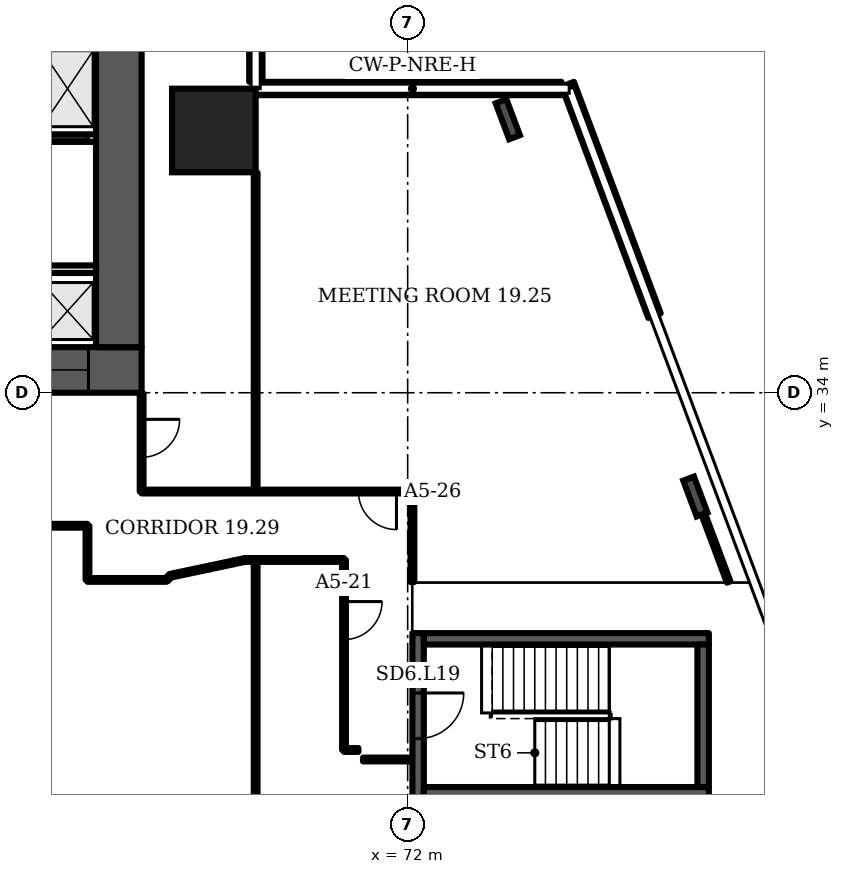
"""IFC4 building model, lengths in metres.
Left out: names, types, materials, properties, quantities, classifications, styles, units other than length and angle.
Written with IfcOpenShell. Run it as: python <this file> out.ifc"""

import sys

from ifc_helpers import new_model, si_unit, direction, frame, frame_2d, origin, origin_2d, place, context, subcontext, project, spatial, polyline, rectangle, i_section, outline, extrude, element, fill, save


model = new_model("IFC4")
c1 = context("Model", 3, precision=1e-05, world=origin(), true_north=direction((0.0, 1.0)))
c2 = subcontext(c1, "Body", "Model", "MODEL_VIEW")
j1 = project(units=[si_unit("LENGTHUNIT", "METRE"), si_unit("PLANEANGLEUNIT", "RADIAN")], contexts=[c1])
p1 = place(None, origin())
s1 = spatial("IfcSite", under=j1, at=p1, CompositionType="ELEMENT")
p2 = place(p1, origin())
s2 = spatial("IfcBuilding", under=s1, at=p2, CompositionType="ELEMENT")
p3 = place(p2, frame((0.0, 0.0, 88.3)))
s3 = spatial("IfcBuildingStorey", under=s2, at=p3, CompositionType="ELEMENT", Elevation=88.3)
p4 = place(p3, frame((9.0, 34.6, 0.0), z_axis=(0.0, 0.0, 1.0), x_axis=(1.0, 0.0, 0.0)))
e1 = element("IfcWall", 1, at=p4, inside=s3, PredefinedType="SHEAR", context=c2, shape_type="SweptSolid", body=[
    extrude(rectangle(XDim=56.0, YDim=1.2, at=frame_2d((28.0, 0.0))), origin(), (0.0, 0.0, 1.0), 3.6),
])
p5 = place(p4, frame((2.0, 0.0, 0.0)))
e2 = element("IfcOpeningElement", 2, at=p5, cuts=e1, PredefinedType="OPENING", context=c2, shape_type="SweptSolid", body=[
    extrude(rectangle(XDim=1.0, YDim=2.1, at=frame_2d((0.5, 1.05))), frame((0.0, 0.61, 0.0), z_axis=(0.0, -1.0, 0.0), x_axis=(1.0, 0.0, 0.0)), (0.0, 0.0, 1.0), 1.22),
])
p6 = place(p4, frame((4.6, 0.0, 0.0)))
e3 = element("IfcOpeningElement", 3, at=p6, cuts=e1, PredefinedType="OPENING", context=c2, shape_type="SweptSolid", body=[
    extrude(rectangle(XDim=1.0, YDim=2.1, at=frame_2d((0.5, 1.05))), frame((0.0, 0.61, 0.0), z_axis=(0.0, -1.0, 0.0), x_axis=(1.0, 0.0, 0.0)), (0.0, 0.0, 1.0), 1.22),
])
p7 = place(p4, frame((7.867, 0.0, 0.0)))
e4 = element("IfcOpeningElement", 4, at=p7, cuts=e1, PredefinedType="OPENING", context=c2, shape_type="SweptSolid", body=[
    extrude(rectangle(XDim=1.1, YDim=2.1, at=frame_2d((0.55, 1.05))), frame((0.0, 0.61, 0.0), z_axis=(0.0, -1.0, 0.0), x_axis=(1.0, 0.0, 0.0)), (0.0, 0.0, 1.0), 1.22),
])
p8 = place(p4, frame((12.033, 0.0, 0.0)))
e5 = element("IfcOpeningElement", 5, at=p8, cuts=e1, PredefinedType="OPENING", context=c2, shape_type="SweptSolid", body=[
    extrude(rectangle(XDim=1.1, YDim=2.1, at=frame_2d((0.55, 1.05))), frame((0.0, 0.61, 0.0), z_axis=(0.0, -1.0, 0.0), x_axis=(1.0, 0.0, 0.0)), (0.0, 0.0, 1.0), 1.22),
])
p9 = place(p4, frame((9.8, 0.0, 0.0)))
e6 = element("IfcOpeningElement", 6, at=p9, cuts=e1, PredefinedType="OPENING", context=c2, shape_type="SweptSolid", body=[
    extrude(rectangle(XDim=1.4, YDim=2.1, at=frame_2d((0.7, 1.05))), frame((0.0, 0.61, 0.0), z_axis=(0.0, -1.0, 0.0), x_axis=(1.0, 0.0, 0.0)), (0.0, 0.0, 1.0), 1.22),
])
p10 = place(p4, frame((14.65, 0.0, 0.0)))
e7 = element("IfcOpeningElement", 7, at=p10, cuts=e1, PredefinedType="OPENING", context=c2, shape_type="SweptSolid", body=[
    extrude(rectangle(XDim=1.2, YDim=2.1, at=frame_2d((0.6, 1.05))), frame((0.0, 0.61, 0.0), z_axis=(0.0, -1.0, 0.0), x_axis=(1.0, 0.0, 0.0)), (0.0, 0.0, 1.0), 1.22),
])
p11 = place(p4, frame((21.867, 0.0, 0.0)))
e8 = element("IfcOpeningElement", 8, at=p11, cuts=e1, PredefinedType="OPENING", context=c2, shape_type="SweptSolid", body=[
    extrude(rectangle(XDim=1.1, YDim=2.1, at=frame_2d((0.55, 1.05))), frame((0.0, 0.61, 0.0), z_axis=(0.0, -1.0, 0.0), x_axis=(1.0, 0.0, 0.0)), (0.0, 0.0, 1.0), 1.22),
])
p12 = place(p4, frame((26.033, 0.0, 0.0)))
e9 = element("IfcOpeningElement", 9, at=p12, cuts=e1, PredefinedType="OPENING", context=c2, shape_type="SweptSolid", body=[
    extrude(rectangle(XDim=1.1, YDim=2.1, at=frame_2d((0.55, 1.05))), frame((0.0, 0.61, 0.0), z_axis=(0.0, -1.0, 0.0), x_axis=(1.0, 0.0, 0.0)), (0.0, 0.0, 1.0), 1.22),
])
p13 = place(p4, frame((23.8, 0.0, 0.0)))
e10 = element("IfcOpeningElement", 10, at=p13, cuts=e1, PredefinedType="OPENING", context=c2, shape_type="SweptSolid", body=[
    extrude(rectangle(XDim=1.4, YDim=2.1, at=frame_2d((0.7, 1.05))), frame((0.0, 0.61, 0.0), z_axis=(0.0, -1.0, 0.0), x_axis=(1.0, 0.0, 0.0)), (0.0, 0.0, 1.0), 1.22),
])
p14 = place(p4, frame((28.867, 0.0, 0.0)))
e11 = element("IfcOpeningElement", 11, at=p14, cuts=e1, PredefinedType="OPENING", context=c2, shape_type="SweptSolid", body=[
    extrude(rectangle(XDim=1.1, YDim=2.1, at=frame_2d((0.55, 1.05))), frame((0.0, 0.61, 0.0), z_axis=(0.0, -1.0, 0.0), x_axis=(1.0, 0.0, 0.0)), (0.0, 0.0, 1.0), 1.22),
])
p15 = place(p4, frame((33.033, 0.0, 0.0)))
e12 = element("IfcOpeningElement", 12, at=p15, cuts=e1, PredefinedType="OPENING", context=c2, shape_type="SweptSolid", body=[
    extrude(rectangle(XDim=1.1, YDim=2.1, at=frame_2d((0.55, 1.05))), frame((0.0, 0.61, 0.0), z_axis=(0.0, -1.0, 0.0), x_axis=(1.0, 0.0, 0.0)), (0.0, 0.0, 1.0), 1.22),
])
p16 = place(p4, frame((40.15, 0.0, 0.0)))
e13 = element("IfcOpeningElement", 13, at=p16, cuts=e1, PredefinedType="OPENING", context=c2, shape_type="SweptSolid", body=[
    extrude(rectangle(XDim=1.2, YDim=2.1, at=frame_2d((0.6, 1.05))), frame((0.0, 0.61, 0.0), z_axis=(0.0, -1.0, 0.0), x_axis=(1.0, 0.0, 0.0)), (0.0, 0.0, 1.0), 1.22),
])
p17 = place(p4, frame((44.8, 0.0, 0.0)))
e14 = element("IfcOpeningElement", 14, at=p17, cuts=e1, PredefinedType="OPENING", context=c2, shape_type="SweptSolid", body=[
    extrude(rectangle(XDim=1.4, YDim=2.1, at=frame_2d((0.7, 1.05))), frame((0.0, 0.61, 0.0), z_axis=(0.0, -1.0, 0.0), x_axis=(1.0, 0.0, 0.0)), (0.0, 0.0, 1.0), 1.22),
])
p18 = place(p4, frame((49.867, 0.0, 0.0)))
e15 = element("IfcOpeningElement", 15, at=p18, cuts=e1, PredefinedType="OPENING", context=c2, shape_type="SweptSolid", body=[
    extrude(rectangle(XDim=1.1, YDim=2.1, at=frame_2d((0.55, 1.05))), frame((0.0, 0.61, 0.0), z_axis=(0.0, -1.0, 0.0), x_axis=(1.0, 0.0, 0.0)), (0.0, 0.0, 1.0), 1.22),
])
p19 = place(p4, frame((53.5, 0.0, 0.0)))
e16 = element("IfcOpeningElement", 16, at=p19, cuts=e1, PredefinedType="OPENING", context=c2, shape_type="SweptSolid", body=[
    extrude(rectangle(XDim=1.1, YDim=2.1, at=frame_2d((0.55, 1.05))), frame((0.0, 0.61, 0.0), z_axis=(0.0, -1.0, 0.0), x_axis=(1.0, 0.0, 0.0)), (0.0, 0.0, 1.0), 1.22),
])
p20 = place(p4, frame((51.567, 0.0, 0.0)))
e17 = element("IfcOpeningElement", 17, at=p20, cuts=e1, PredefinedType="OPENING", context=c2, shape_type="SweptSolid", body=[
    extrude(rectangle(XDim=1.4, YDim=2.1, at=frame_2d((0.7, 1.05))), frame((0.0, 0.61, 0.0), z_axis=(0.0, -1.0, 0.0), x_axis=(1.0, 0.0, 0.0)), (0.0, 0.0, 1.0), 1.22),
])
p21 = place(p3, frame((64.4, 35.2, 0.0), z_axis=(0.0, 0.0, 1.0), x_axis=(0.0, 1.0, 0.0)))
e18 = element("IfcWall", 18, at=p21, inside=s3, PredefinedType="SHEAR", context=c2, shape_type="SweptSolid", body=[
    extrude(rectangle(XDim=12.383, YDim=1.2, at=frame_2d((6.191, 0.0))), origin(), (0.0, 0.0, 1.0), 3.6),
])
p22 = place(p3, frame((66.9, 40.9, 0.0), z_axis=(0.0, 0.0, 1.0), x_axis=(1.0, 0.0, 0.0)))
e19 = element("IfcColumn", 19, at=p22, inside=s3, PredefinedType="COLUMN", context=c2, shape_type="SweptSolid", body=[
    extrude(rectangle(XDim=2.2, YDim=2.2, at=origin_2d()), origin(), (0.0, 0.0, 1.0), 3.6),
])
for number, where, z_axis, x_axis in (
    (20, (79.57, 31.268, 0.0), (0.0, 0.0, 1.0), (0.936, 0.351, 0.0)),
    (21, (74.634, 41.196, 0.0), (0.0, 0.0, 1.0), (0.936, 0.351, 0.0)),
):
    element("IfcColumn", number, at=place(p3, frame(where, z_axis=z_axis, x_axis=x_axis)), inside=s3, PredefinedType="COLUMN", context=c2, shape_type="SweptSolid", body=[
        extrude(i_section(OverallWidth=0.302, OverallDepth=1.008, WebThickness=0.021, FlangeThickness=0.04, FilletRadius=0.03, at=origin_2d()), origin(), (0.0, 0.0, 1.0), 3.6),
    ])
p23 = place(p3, frame((78.494, 36.03, 0.0), z_axis=(0.0, 0.0, 1.0), x_axis=(-0.351108, 0.936338, 0.0)))
e22 = element("IfcWall", 22, at=p23, inside=s3, PredefinedType="SOLIDWALL", context=c2, shape_type="SweptSolid", body=[
    extrude(rectangle(XDim=6.503, YDim=0.35, at=frame_2d((3.251, 0.0))), origin(), (0.0, 0.0, 1.0), 1.0),
])
p24 = place(p3, frame((76.047, 42.005, 0.0), z_axis=(0.0, 0.0, 1.0), x_axis=(-1.0, 0.0, 0.0)))
e23 = element("IfcWall", 23, at=p24, inside=s3, PredefinedType="SOLIDWALL", context=c2, shape_type="SweptSolid", body=[
    extrude(rectangle(XDim=8.047, YDim=0.35, at=frame_2d((4.023, 0.0))), origin(), (0.0, 0.0, 1.0), 1.0),
])
p25 = place(p3, frame((68.005, 42.18, 0.0), z_axis=(0.0, 0.0, 1.0), x_axis=(0.0, 1.0, 0.0)))
e24 = element("IfcWall", 24, at=p25, inside=s3, PredefinedType="SOLIDWALL", context=c2, shape_type="SweptSolid", body=[
    extrude(rectangle(XDim=5.947, YDim=0.35, at=frame_2d((2.973, 0.0))), origin(), (0.0, 0.0, 1.0), 1.0),
])
p26 = place(p3, frame((58.6, 40.7, 0.0), z_axis=(0.0, 0.0, 1.0), x_axis=(1.0, 0.0, 0.0)))
e25 = element("IfcWall", 25, at=p26, inside=s3, PredefinedType="PARTITIONING", context=c2, shape_type="SweptSolid", body=[
    extrude(rectangle(XDim=5.2, YDim=0.2, at=frame_2d((2.6, 0.0))), origin(), (0.0, 0.0, 1.0), 3.15),
])
p27 = place(p26, frame((0.267, 0.0, 0.0)))
e26 = element("IfcOpeningElement", 26, at=p27, cuts=e25, PredefinedType="OPENING", context=c2, shape_type="SweptSolid", body=[
    extrude(rectangle(XDim=1.1, YDim=2.1, at=frame_2d((0.55, 1.05))), frame((0.0, 0.11, 0.0), z_axis=(0.0, -1.0, 0.0), x_axis=(1.0, 0.0, 0.0)), (0.0, 0.0, 1.0), 0.22),
])
p28 = place(p26, frame((2.117, 0.0, 0.0)))
e27 = element("IfcOpeningElement", 27, at=p28, cuts=e25, PredefinedType="OPENING", context=c2, shape_type="SweptSolid", body=[
    extrude(rectangle(XDim=1.1, YDim=2.1, at=frame_2d((0.55, 1.05))), frame((0.0, 0.11, 0.0), z_axis=(0.0, -1.0, 0.0), x_axis=(1.0, 0.0, 0.0)), (0.0, 0.0, 1.0), 0.22),
])
p29 = place(p26, frame((3.9, 0.0, 0.0)))
e28 = element("IfcOpeningElement", 28, at=p29, cuts=e25, PredefinedType="OPENING", context=c2, shape_type="SweptSolid", body=[
    extrude(rectangle(XDim=1.1, YDim=2.1, at=frame_2d((0.55, 1.05))), frame((0.0, 0.11, 0.0), z_axis=(0.0, -1.0, 0.0), x_axis=(1.0, 0.0, 0.0)), (0.0, 0.0, 1.0), 0.22),
])
p30 = place(p3, frame((0.0, 0.0, -0.0)))
e29 = element("IfcWall", 29, at=p30, inside=s3, PredefinedType="PARTITIONING", context=c2, shape_type="SweptSolid", body=[
    extrude(outline(polyline([(62.1, 37.35), (62.3, 37.35), (63.8, 37.35), (63.8, 37.15), (62.3, 37.15), (62.3, 35.2), (62.1, 35.2), (62.1, 37.35)])), origin(), (0.0, 0.0, 1.0), 3.15),
])
p31 = place(p3, frame((0.0, 0.0, -0.0)))
e30 = element("IfcWall", 30, at=p31, inside=s3, PredefinedType="PARTITIONING", context=c2, shape_type="SweptSolid", body=[
    extrude(outline(polyline([(60.433, 40.8), (60.233, 40.8), (60.233, 43.8), (58.6, 43.8), (58.6, 44.0), (63.8, 44.0), (63.8, 43.8), (62.3, 43.8), (62.3, 40.8), (62.1, 40.8), (62.1, 43.8), (60.433, 43.8), (60.433, 40.8)])), origin(), (0.0, 0.0, 1.0), 3.15),
])
p32 = place(p3, frame((72.275, 23.325, 0.0), z_axis=(0.0, 0.0, 1.0), x_axis=(0.0, 1.0, 0.0)))
e31 = element("IfcWall", 31, at=p32, inside=s3, PredefinedType="SHEAR", context=c2, shape_type="SweptSolid", body=[
    extrude(rectangle(XDim=4.35, YDim=0.3, at=frame_2d((2.175, 0.0))), origin(), (0.0, 0.0, 1.0), 3.15),
])
p33 = place(p32, frame((1.575, 0.0, 0.0)))
e32 = element("IfcOpeningElement", 32, at=p33, cuts=e31, PredefinedType="OPENING", context=c2, shape_type="SweptSolid", body=[
    extrude(rectangle(XDim=1.2, YDim=2.1, at=frame_2d((0.6, 1.05))), frame((0.0, 0.16, 0.0), z_axis=(0.0, -1.0, 0.0), x_axis=(1.0, 0.0, 0.0)), (0.0, 0.0, 1.0), 0.32),
])
p34 = place(p3, frame((45.3, 30.5, 0.0), z_axis=(0.0, 0.0, 1.0), x_axis=(1.0, 0.0, 0.0)))
e33 = element("IfcWall", 33, at=p34, inside=s3, PredefinedType="PARTITIONING", context=c2, shape_type="SweptSolid", body=[
    extrude(rectangle(XDim=18.275, YDim=0.1, at=frame_2d((9.137, 0.0))), origin(), (0.0, 0.0, 1.0), 3.15),
])
p35 = place(p3, frame((63.575, 29.075, 0.0), z_axis=(0.0, 0.0, 1.0), x_axis=(0.0, 1.0, 0.0)))
e34 = element("IfcWall", 34, at=p35, inside=s3, PredefinedType="PARTITIONING", context=c2, shape_type="SweptSolid", body=[
    extrude(rectangle(XDim=1.425, YDim=0.1, at=frame_2d((0.712, 0.0))), origin(), (0.0, 0.0, 1.0), 3.15),
])
p36 = place(p3, frame((63.575, 29.075, 0.0), z_axis=(0.0, 0.0, 1.0), x_axis=(1.0, 0.0, 0.0)))
e35 = element("IfcWall", 35, at=p36, inside=s3, PredefinedType="PARTITIONING", context=c2, shape_type="SweptSolid", body=[
    extrude(rectangle(XDim=2.08, YDim=0.1, at=frame_2d((1.04, 0.0))), origin(), (0.0, 0.0, 1.0), 3.15),
])
p37 = place(p3, frame((65.0, 31.4, 0.0), z_axis=(0.0, 0.0, 1.0), x_axis=(0.0, 1.0, 0.0)))
e36 = element("IfcWall", 36, at=p37, inside=s3, PredefinedType="PARTITIONING", context=c2, shape_type="SweptSolid", body=[
    extrude(rectangle(XDim=2.58, YDim=0.1, at=frame_2d((1.29, 0.0))), origin(), (0.0, 0.0, 1.0), 3.15),
])
p38 = place(p37, frame((0.9, 0.0, 0.0)))
e37 = element("IfcOpeningElement", 37, at=p38, cuts=e36, PredefinedType="OPENING", context=c2, shape_type="SweptSolid", body=[
    extrude(rectangle(XDim=1.0, YDim=2.1, at=frame_2d((0.5, 1.05))), frame((0.0, 0.06, 0.0), z_axis=(0.0, -1.0, 0.0), x_axis=(1.0, 0.0, 0.0)), (0.0, 0.0, 1.0), 0.12),
])
p39 = place(p3, frame((65.0, 31.4, 0.0), z_axis=(0.0, 0.0, 1.0), x_axis=(1.0, 0.0, 0.0)))
e38 = element("IfcWall", 38, at=p39, inside=s3, PredefinedType="PARTITIONING", context=c2, shape_type="SweptSolid", body=[
    extrude(rectangle(XDim=7.125, YDim=0.1, at=frame_2d((3.562, 0.0))), origin(), (0.0, 0.0, 1.0), 3.15),
])
p40 = place(p39, frame((5.705, 0.0, 0.0)))
e39 = element("IfcOpeningElement", 39, at=p40, cuts=e38, PredefinedType="OPENING", context=c2, shape_type="SweptSolid", body=[
    extrude(rectangle(XDim=1.0, YDim=2.1, at=frame_2d((0.5, 1.05))), frame((0.0, 0.06, 0.0), z_axis=(0.0, -1.0, 0.0), x_axis=(1.0, 0.0, 0.0)), (0.0, 0.0, 1.0), 0.12),
])
p41 = place(p3, frame((65.655, 29.075, 0.0), z_axis=(0.0, 0.0, 1.0), x_axis=(0.671773, 0.740757, 0.0)))
e40 = element("IfcWall", 40, at=p41, inside=s3, PredefinedType="PARTITIONING", context=c2, shape_type="SweptSolid", body=[
    extrude(rectangle(XDim=0.149, YDim=0.1, at=frame_2d((0.074, 0.0))), origin(), (0.0, 0.0, 1.0), 3.15),
])
p42 = place(p3, frame((65.755, 29.185, 0.0), z_axis=(0.0, 0.0, 1.0), x_axis=(0.978739, 0.205118, 0.0)))
e41 = element("IfcWall", 41, at=p42, inside=s3, PredefinedType="PARTITIONING", context=c2, shape_type="SweptSolid", body=[
    extrude(rectangle(XDim=1.047, YDim=0.1, at=frame_2d((0.524, 0.0))), origin(), (0.0, 0.0, 1.0), 3.15),
])
p43 = place(p3, frame((66.78, 29.4, 0.0), z_axis=(0.0, 0.0, 1.0), x_axis=(0.977792, 0.209581, 0.0)))
e42 = element("IfcWall", 42, at=p43, inside=s3, PredefinedType="PARTITIONING", context=c2, shape_type="SweptSolid", body=[
    extrude(rectangle(XDim=0.644, YDim=0.1, at=frame_2d((0.322, 0.0))), origin(), (0.0, 0.0, 1.0), 3.15),
])
p44 = place(p3, frame((67.41, 29.535, 0.0), z_axis=(0.0, 0.0, 1.0), x_axis=(0.978604, 0.205738, 0.0)))
e43 = element("IfcWall", 43, at=p44, inside=s3, PredefinedType="PARTITIONING", context=c2, shape_type="SweptSolid", body=[
    extrude(rectangle(XDim=0.317, YDim=0.1, at=frame_2d((0.158, 0.0))), origin(), (0.0, 0.0, 1.0), 3.15),
])
p45 = place(p3, frame((67.72, 29.6, 0.0), z_axis=(0.0, 0.0, 1.0), x_axis=(1.0, 0.0, 0.0)))
e44 = element("IfcWall", 44, at=p45, inside=s3, PredefinedType="PARTITIONING", context=c2, shape_type="SweptSolid", body=[
    extrude(rectangle(XDim=2.605, YDim=0.1, at=frame_2d((1.302, 0.0))), origin(), (0.0, 0.0, 1.0), 3.15),
])
p46 = place(p3, frame((68.0, 14.93, 0.0), z_axis=(0.0, 0.0, 1.0), x_axis=(0.0, 1.0, 0.0)))
e45 = element("IfcWall", 45, at=p46, inside=s3, PredefinedType="PARTITIONING", context=c2, shape_type="SweptSolid", body=[
    extrude(rectangle(XDim=14.67, YDim=0.1, at=frame_2d((7.335, 0.0))), origin(), (0.0, 0.0, 1.0), 3.15),
])
p47 = place(p3, frame((68.0, 31.4, 0.0), z_axis=(0.0, 0.0, 1.0), x_axis=(0.0, 1.0, 0.0)))
e46 = element("IfcWall", 46, at=p47, inside=s3, PredefinedType="PARTITIONING", context=c2, shape_type="SweptSolid", body=[
    extrude(rectangle(XDim=8.39, YDim=0.1, at=frame_2d((4.195, 0.0))), origin(), (0.0, 0.0, 1.0), 3.15),
])
p48 = place(p3, frame((70.325, 24.6, 0.0), z_axis=(0.0, 0.0, 1.0), x_axis=(0.0, 1.0, 0.0)))
e47 = element("IfcWall", 47, at=p48, inside=s3, PredefinedType="PARTITIONING", context=c2, shape_type="SweptSolid", body=[
    extrude(rectangle(XDim=5.0, YDim=0.1, at=frame_2d((2.5, 0.0))), origin(), (0.0, 0.0, 1.0), 3.15),
])
p49 = place(p48, frame((2.905, 0.0, 0.0)))
e48 = element("IfcOpeningElement", 48, at=p49, cuts=e47, PredefinedType="OPENING", context=c2, shape_type="SweptSolid", body=[
    extrude(rectangle(XDim=1.0, YDim=2.1, at=frame_2d((0.5, 1.05))), frame((0.0, 0.06, 0.0), z_axis=(0.0, -1.0, 0.0), x_axis=(1.0, 0.0, 0.0)), (0.0, 0.0, 1.0), 0.12),
])
p50 = place(p3, frame((70.325, 24.6, 0.0), z_axis=(0.0, 0.0, 1.0), x_axis=(1.0, 0.0, 0.0)))
e49 = element("IfcWall", 49, at=p50, inside=s3, PredefinedType="PARTITIONING", context=c2, shape_type="SweptSolid", body=[
    extrude(rectangle(XDim=0.38, YDim=0.1, at=frame_2d((0.19, 0.0))), origin(), (0.0, 0.0, 1.0), 3.15),
])
p51 = place(p3, frame((70.825, 24.35, 0.0), z_axis=(0.0, 0.0, 1.0), x_axis=(1.0, 0.0, 0.0)))
e50 = element("IfcWall", 50, at=p51, inside=s3, PredefinedType="PARTITIONING", context=c2, shape_type="SweptSolid", body=[
    extrude(rectangle(XDim=1.28, YDim=0.1, at=frame_2d((0.64, 0.0))), origin(), (0.0, 0.0, 1.0), 3.15),
])
p52 = place(p3, frame((72.125, 29.02, 0.0), z_axis=(0.0, 0.0, 1.0), x_axis=(0.0, 1.0, 0.0)))
e51 = element("IfcWall", 51, at=p52, inside=s3, PredefinedType="PARTITIONING", context=c2, shape_type="SweptSolid", body=[
    extrude(rectangle(XDim=2.38, YDim=0.1, at=frame_2d((1.19, 0.0))), origin(), (0.0, 0.0, 1.0), 3.15),
])
p53 = place(p3, frame((80.446, 29.02, 0.0), z_axis=(0.0, 0.0, 1.0), x_axis=(-0.350707, 0.936481, 0.0)))
e52 = element("IfcWall", 52, at=p53, inside=s3, PredefinedType="PARTITIONING", context=c2, shape_type="SweptSolid", body=[
    extrude(rectangle(XDim=2.901, YDim=0.1, at=frame_2d((1.45, 0.0))), origin(), (0.0, 0.0, 1.0), 2.53),
])
for number, where, z_axis, x_axis in (
    (53, (72.425, 23.475, 0.0), (0.0, 0.0, 1.0), (1.0, 0.0, 0.0)),
    (54, (72.425, 27.525, 0.0), (0.0, 0.0, 1.0), (1.0, 0.0, 0.0)),
):
    element("IfcWall", number, at=place(p3, frame(where, z_axis=z_axis, x_axis=x_axis)), inside=s3, PredefinedType="SHEAR", context=c2, shape_type="SweptSolid", body=[
        extrude(rectangle(XDim=7.5, YDim=0.3, at=frame_2d((3.75, 0.0))), origin(), (0.0, 0.0, 1.0), 3.15),
    ])
p54 = place(p3, frame((79.775, 23.625, 0.0), z_axis=(0.0, 0.0, 1.0), x_axis=(0.0, 1.0, 0.0)))
e55 = element("IfcWall", 55, at=p54, inside=s3, PredefinedType="SHEAR", context=c2, shape_type="SweptSolid", body=[
    extrude(rectangle(XDim=3.75, YDim=0.3, at=frame_2d((1.875, 0.0))), origin(), (0.0, 0.0, 1.0), 3.15),
])
p55 = place(p19, origin())
e56 = element("IfcDoor", 56, at=p55, inside=s3, OperationType="DOUBLE_DOOR_SLIDING", PredefinedType="DOOR", context=c2, shape_type="SweptSolid", body=[
    extrude(rectangle(XDim=1.1, YDim=2.1, at=frame_2d((0.55, 1.05))), frame((0.0, 0.025, 0.0), z_axis=(0.0, -1.0, 0.0), x_axis=(1.0, 0.0, 0.0)), (0.0, 0.0, 1.0), 0.05),
])
fill(e16, e56)
p56 = place(p29, origin())
e57 = element("IfcDoor", 57, at=p56, inside=s3, OperationType="DOUBLE_DOOR_SLIDING", PredefinedType="DOOR", context=c2, shape_type="SweptSolid", body=[
    extrude(rectangle(XDim=1.1, YDim=2.1, at=frame_2d((0.55, 1.05))), frame((0.0, 0.025, 0.0), z_axis=(0.0, -1.0, 0.0), x_axis=(1.0, 0.0, 0.0)), (0.0, 0.0, 1.0), 0.05),
])
fill(e28, e57)
p57 = place(p33, origin())
e58 = element("IfcDoor", 58, at=p57, inside=s3, OperationType="SINGLE_SWING_RIGHT", PredefinedType="DOOR", context=c2, shape_type="SweptSolid", body=[
    extrude(rectangle(XDim=1.2, YDim=2.1, at=frame_2d((0.6, 1.05))), frame((0.0, 0.025, 0.0), z_axis=(0.0, -1.0, 0.0), x_axis=(1.0, 0.0, 0.0)), (0.0, 0.0, 1.0), 0.05),
])
fill(e32, e58)
p58 = place(p49, origin())
e59 = element("IfcDoor", 59, at=p58, inside=s3, OperationType="SINGLE_SWING_RIGHT", PredefinedType="DOOR", context=c2, shape_type="SweptSolid", body=[
    extrude(rectangle(XDim=1.0, YDim=2.1, at=frame_2d((0.5, 1.05))), frame((0.0, 0.025, 0.0), z_axis=(0.0, -1.0, 0.0), x_axis=(1.0, 0.0, 0.0)), (0.0, 0.0, 1.0), 0.05),
])
fill(e48, e59)
p59 = place(p40, origin())
e60 = element("IfcDoor", 60, at=p59, inside=s3, OperationType="SINGLE_SWING_RIGHT", PredefinedType="DOOR", context=c2, shape_type="SweptSolid", body=[
    extrude(rectangle(XDim=1.0, YDim=2.1, at=frame_2d((0.5, 1.05))), frame((0.0, 0.025, 0.0), z_axis=(0.0, -1.0, 0.0), x_axis=(1.0, 0.0, 0.0)), (0.0, 0.0, 1.0), 0.05),
])
fill(e39, e60)
p60 = place(p38, origin())
e61 = element("IfcDoor", 61, at=p60, inside=s3, OperationType="SINGLE_SWING_RIGHT", PredefinedType="DOOR", context=c2, shape_type="SweptSolid", body=[
    extrude(rectangle(XDim=1.0, YDim=2.1, at=frame_2d((0.5, 1.05))), frame((0.0, 0.025, 0.0), z_axis=(0.0, -1.0, 0.0), x_axis=(1.0, 0.0, 0.0)), (0.0, 0.0, 1.0), 0.05),
])
fill(e37, e61)
save(model, sys.argv[1])
